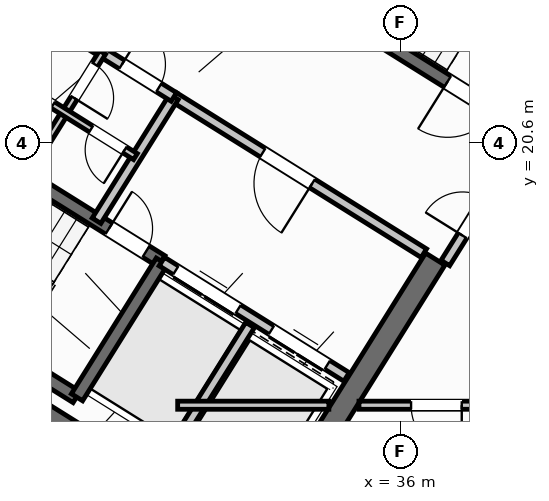
"""IFC4 building model, lengths in metres.
Left out: names, types, materials, properties, quantities, classifications, styles, units other than length and angle.
Written with IfcOpenShell. Run it as: python <this file> out.ifc"""

import sys

from ifc_helpers import new_model, si_unit, direction, frame, frame_2d, origin, place, context, subcontext, project, spatial, rectangle, extrude, source, transform, mapped, element, fill, save


model = new_model("IFC4")
c1 = context("Model", 3, precision=1e-05, world=origin(), true_north=direction((0.0, 1.0)))
c2 = subcontext(c1, "Body", "Model", "MODEL_VIEW")
j1 = project(units=[si_unit("LENGTHUNIT", "METRE"), si_unit("PLANEANGLEUNIT", "RADIAN")], contexts=[c1])
p1 = place(None, origin())
s1 = spatial("IfcSite", under=j1, at=p1, CompositionType="ELEMENT")
p2 = place(p1, origin())
s2 = spatial("IfcBuilding", under=s1, at=p2, CompositionType="ELEMENT")
p3 = place(p2, frame((0.0, 0.0, 242.1)))
s3 = spatial("IfcBuildingStorey", under=s2, at=p3, CompositionType="ELEMENT", Elevation=242.1)
p4 = place(p3, frame((33.324, 12.503, 0.0), z_axis=(0.0, 0.0, 1.0), x_axis=(-0.848043529849, 0.529926571782, 0.0)))
e1 = element("IfcWall", 1, at=p4, inside=s3, PredefinedType="SHEAR", context=c2, shape_type="SweptSolid", body=[
    extrude(rectangle(XDim=13.04, YDim=0.45, at=frame_2d((6.52, 0.0))), origin(), (0.0, 0.0, 1.0), 3.32),
])
p5 = place(p3, frame((36.683, 18.304, 0.0), z_axis=(0.0, 0.0, 1.0), x_axis=(-0.529904039071, -0.848057609704, 0.0)))
e2 = element("IfcWall", 2, at=p5, inside=s3, PredefinedType="SHEAR", context=c2, shape_type="SweptSolid", body=[
    extrude(rectangle(XDim=6.475, YDim=0.45, at=frame_2d((3.238, 0.0))), origin(), (0.0, 0.0, 1.0), 3.32),
])
p6 = place(p3, frame((29.268, 6.429, 0.0), z_axis=(0.0, 0.0, 1.0), x_axis=(-0.848049971435, 0.529916263149, 0.0)))
e3 = element("IfcWall", 3, at=p6, inside=s3, PredefinedType="STANDARD", context=c2, shape_type="SweptSolid", body=[
    extrude(rectangle(XDim=31.588, YDim=0.32, at=frame_2d((15.794, 0.0))), origin(), (0.0, 0.0, 1.0), 3.32),
])
p7 = place(p6, frame((16.235, 0.0, 0.0)))
e4 = element("IfcOpeningElement", 4, at=p7, cuts=e3, PredefinedType="OPENING", context=c2, shape_type="SweptSolid", body=[
    extrude(rectangle(XDim=1.2, YDim=2.15, at=frame_2d((0.6, 1.075))), frame((0.0, 0.17, 0.0), z_axis=(0.0, -1.0, 0.0), x_axis=(1.0, 0.0, 0.0)), (0.0, 0.0, 1.0), 0.34),
])
p8 = place(p6, frame((3.859, 0.0, 0.9)))
e5 = element("IfcOpeningElement", 5, at=p8, cuts=e3, PredefinedType="OPENING", context=c2, shape_type="SweptSolid", body=[
    extrude(rectangle(XDim=1.65, YDim=1.45, at=frame_2d((0.825, 0.725))), frame((0.0, 0.17, 0.0), z_axis=(0.0, -1.0, 0.0), x_axis=(1.0, 0.0, 0.0)), (0.0, 0.0, 1.0), 0.34),
])
p9 = place(p6, frame((10.519, 0.0, 0.9)))
e6 = element("IfcOpeningElement", 6, at=p9, cuts=e3, PredefinedType="OPENING", context=c2, shape_type="SweptSolid", body=[
    extrude(rectangle(XDim=1.65, YDim=1.45, at=frame_2d((0.825, 0.725))), frame((0.0, 0.17, 0.0), z_axis=(0.0, -1.0, 0.0), x_axis=(1.0, 0.0, 0.0)), (0.0, 0.0, 1.0), 0.34),
])
p10 = place(p6, frame((19.182, 0.0, 1.0)))
e7 = element("IfcOpeningElement", 7, at=p10, cuts=e3, PredefinedType="OPENING", context=c2, shape_type="SweptSolid", body=[
    extrude(rectangle(XDim=0.9, YDim=1.25, at=frame_2d((0.45, 0.625))), frame((0.0, 0.17, 0.0), z_axis=(0.0, -1.0, 0.0), x_axis=(1.0, 0.0, 0.0)), (0.0, 0.0, 1.0), 0.34),
])
p11 = place(p6, frame((22.524, 0.0, 1.0)))
e8 = element("IfcOpeningElement", 8, at=p11, cuts=e3, PredefinedType="OPENING", context=c2, shape_type="SweptSolid", body=[
    extrude(rectangle(XDim=0.9, YDim=1.25, at=frame_2d((0.45, 0.625))), frame((0.0, 0.17, 0.0), z_axis=(0.0, -1.0, 0.0), x_axis=(1.0, 0.0, 0.0)), (0.0, 0.0, 1.0), 0.34),
])
p12 = place(p6, frame((25.658, 0.0, 0.9)))
e9 = element("IfcOpeningElement", 9, at=p12, cuts=e3, PredefinedType="OPENING", context=c2, shape_type="SweptSolid", body=[
    extrude(rectangle(XDim=1.65, YDim=1.45, at=frame_2d((0.825, 0.725))), frame((0.0, 0.17, 0.0), z_axis=(0.0, -1.0, 0.0), x_axis=(1.0, 0.0, 0.0)), (0.0, 0.0, 1.0), 0.34),
])
p13 = place(p6, frame((29.278, 0.0, 0.9)))
e10 = element("IfcOpeningElement", 10, at=p13, cuts=e3, PredefinedType="OPENING", context=c2, shape_type="SweptSolid", body=[
    extrude(rectangle(XDim=1.35, YDim=1.45, at=frame_2d((0.675, 0.725))), frame((0.0, 0.17, 0.0), z_axis=(0.0, -1.0, 0.0), x_axis=(1.0, 0.0, 0.0)), (0.0, 0.0, 1.0), 0.34),
])
p14 = place(p3, frame((29.605, 15.581, 0.0), z_axis=(0.0, 0.0, 1.0), x_axis=(-0.848036911448, 0.529937163087, 0.0)))
e11 = element("IfcWall", 11, at=p14, inside=s3, PredefinedType="SHEAR", context=c2, shape_type="SweptSolid", body=[
    extrude(rectangle(XDim=7.46, YDim=0.26, at=frame_2d((3.73, 0.0))), origin(), (0.0, 0.0, 1.0), 3.32),
])
p15 = place(p3, frame((31.28, 18.261, 0.0), z_axis=(0.0, 0.0, 1.0), x_axis=(-0.848051618787, 0.529913626805, 0.0)))
e12 = element("IfcWall", 12, at=p15, inside=s3, PredefinedType="SHEAR", context=c2, shape_type="SweptSolid", body=[
    extrude(rectangle(XDim=7.46, YDim=0.26, at=frame_2d((3.73, 0.0))), origin(), (0.0, 0.0, 1.0), 3.32),
])
p16 = place(p15, frame((0.36, 0.0, 0.0)))
e13 = element("IfcOpeningElement", 13, at=p16, cuts=e12, PredefinedType="OPENING", context=c2, shape_type="SweptSolid", body=[
    extrude(rectangle(XDim=0.86, YDim=2.05, at=frame_2d((0.43, 1.025))), frame((0.0, 0.14, 0.0), z_axis=(0.0, -1.0, 0.0), x_axis=(1.0, 0.0, 0.0)), (0.0, 0.0, 1.0), 0.28),
])
p17 = place(p3, frame((31.288, 18.256, 0.0), z_axis=(0.0, 0.0, 1.0), x_axis=(-0.529943379326, -0.848033026897, 0.0)))
e14 = element("IfcWall", 14, at=p17, inside=s3, PredefinedType="SHEAR", context=c2, shape_type="SweptSolid", body=[
    extrude(rectangle(XDim=3.16, YDim=0.26, at=frame_2d((1.58, 0.0))), origin(), (0.0, 0.0, 1.0), 3.32),
])
p18 = place(p3, frame((38.046, 21.108, 0.0), z_axis=(0.0, 0.0, 1.0), x_axis=(-0.848054434086, 0.529909121291, 0.0)))
e15 = element("IfcWall", 15, at=p18, inside=s3, PredefinedType="SHEAR", context=c2, shape_type="SweptSolid", body=[
    extrude(rectangle(XDim=7.33, YDim=0.26, at=frame_2d((3.665, 0.0))), origin(), (0.0, 0.0, 1.0), 3.32),
])
p19 = place(p18, frame((0.22, 0.0, 0.0)))
e16 = element("IfcOpeningElement", 16, at=p19, cuts=e15, PredefinedType="OPENING", context=c2, shape_type="SweptSolid", body=[
    extrude(rectangle(XDim=1.1, YDim=2.1, at=frame_2d((0.55, 1.05))), frame((0.0, 0.14, 0.0), z_axis=(0.0, -1.0, 0.0), x_axis=(1.0, 0.0, 0.0)), (0.0, 0.0, 1.0), 0.28),
])
p20 = place(p3, frame((34.933, 15.978, 0.0), z_axis=(0.0, 0.0, 1.0), x_axis=(-0.848055739377, 0.529907032327, 0.0)))
e17 = element("IfcWall", 17, at=p20, inside=s3, PredefinedType="STANDARD", context=c2, shape_type="SweptSolid", body=[
    extrude(rectangle(XDim=4.298, YDim=0.2, at=frame_2d((2.149, 0.0))), origin(), (0.0, 0.0, 1.0), 3.31),
])
p21 = place(p20, frame((0.448, 0.0, 0.0)))
e18 = element("IfcOpeningElement", 18, at=p21, cuts=e17, PredefinedType="OPENING", context=c2, shape_type="SweptSolid", body=[
    extrude(rectangle(XDim=1.3, YDim=2.2, at=frame_2d((0.65, 1.1))), frame((0.0, 0.11, 0.0), z_axis=(0.0, -1.0, 0.0), x_axis=(1.0, 0.0, 0.0)), (0.0, 0.0, 1.0), 0.22),
])
p22 = place(p20, frame((2.523, 0.0, 0.0)))
e19 = element("IfcOpeningElement", 19, at=p22, cuts=e17, PredefinedType="OPENING", context=c2, shape_type="SweptSolid", body=[
    extrude(rectangle(XDim=1.45, YDim=2.25, at=frame_2d((0.725, 1.125))), frame((0.0, 0.11, 0.0), z_axis=(0.0, -1.0, 0.0), x_axis=(1.0, 0.0, 0.0)), (0.0, 0.0, 1.0), 0.22),
])
p23 = place(p3, frame((36.459, 18.421, 0.0), z_axis=(0.0, 0.0, 1.0), x_axis=(-0.848059591691, 0.529900867089, 0.0)))
e20 = element("IfcWall", 20, at=p23, inside=s3, PredefinedType="STANDARD", context=c2, shape_type="SweptSolid", body=[
    extrude(rectangle(XDim=5.818, YDim=0.2, at=frame_2d((2.909, 0.0))), origin(), (0.0, 0.0, 1.0), 3.31),
])
p24 = place(p23, frame((2.598, 0.0, 0.0)))
e21 = element("IfcOpeningElement", 21, at=p24, cuts=e20, PredefinedType="OPENING", context=c2, shape_type="SweptSolid", body=[
    extrude(rectangle(XDim=1.15, YDim=2.1, at=frame_2d((0.575, 1.05))), frame((0.0, 0.11, 0.0), z_axis=(0.0, -1.0, 0.0), x_axis=(1.0, 0.0, 0.0)), (0.0, 0.0, 1.0), 0.22),
])
p25 = place(p3, frame((33.029, 17.003, 0.0), z_axis=(0.0, 0.0, 1.0), x_axis=(-0.529916267533, -0.848049968695, 0.0)))
e22 = element("IfcWall", 22, at=p25, inside=s3, PredefinedType="STANDARD", context=c2, shape_type="SweptSolid", body=[
    extrude(rectangle(XDim=2.92, YDim=0.2, at=frame_2d((1.46, 0.0))), origin(), (0.0, 0.0, 1.0), 3.31),
])
p26 = place(p3, frame((31.525, 21.504, 0.0), z_axis=(0.0, 0.0, 1.0), x_axis=(-0.529907497854, -0.848055448493, 0.0)))
e23 = element("IfcWall", 23, at=p26, inside=s3, PredefinedType="STANDARD", context=c2, shape_type="SweptSolid", body=[
    extrude(rectangle(XDim=2.88, YDim=0.2, at=frame_2d((1.44, 0.0))), origin(), (0.0, 0.0, 1.0), 3.31),
])
p27 = place(p3, frame((31.525, 21.504, 0.0), z_axis=(0.0, 0.0, 1.0), x_axis=(-0.848042066329, 0.529928913853, 0.0)))
e24 = element("IfcWall", 24, at=p27, inside=s3, PredefinedType="STANDARD", context=c2, shape_type="SweptSolid", body=[
    extrude(rectangle(XDim=6.268, YDim=0.2, at=frame_2d((3.134, 0.0))), origin(), (0.0, 0.0, 1.0), 3.31),
])
p28 = place(p27, frame((4.4, 0.0, 0.0)))
e25 = element("IfcOpeningElement", 25, at=p28, cuts=e24, PredefinedType="OPENING", context=c2, shape_type="SweptSolid", body=[
    extrude(rectangle(XDim=0.86, YDim=2.05, at=frame_2d((0.43, 1.025))), frame((0.0, 0.11, 0.0), z_axis=(0.0, -1.0, 0.0), x_axis=(1.0, 0.0, 0.0)), (0.0, 0.0, 1.0), 0.22),
])
p29 = place(p27, frame((0.35, 0.0, 0.0)))
e26 = element("IfcOpeningElement", 26, at=p29, cuts=e24, PredefinedType="OPENING", context=c2, shape_type="SweptSolid", body=[
    extrude(rectangle(XDim=0.86, YDim=2.05, at=frame_2d((0.43, 1.025))), frame((0.0, 0.11, 0.0), z_axis=(0.0, -1.0, 0.0), x_axis=(1.0, 0.0, 0.0)), (0.0, 0.0, 1.0), 0.22),
])
p30 = place(p3, frame((30.117, 22.384, 0.0), z_axis=(0.0, 0.0, 1.0), x_axis=(-0.529951914384, -0.848027693204, 0.0)))
e27 = element("IfcWall", 27, at=p30, inside=s3, PredefinedType="PLUMBINGWALL", context=c2, shape_type="SweptSolid", body=[
    extrude(rectangle(XDim=1.4, YDim=0.14, at=frame_2d((0.7, 0.0))), origin(), (0.0, 0.0, 1.0), 3.31),
])
p31 = place(p30, frame((0.28, 0.0, 0.0)))
e28 = element("IfcOpeningElement", 28, at=p31, cuts=e27, PredefinedType="OPENING", context=c2, shape_type="SweptSolid", body=[
    extrude(rectangle(XDim=0.78, YDim=2.05, at=frame_2d((0.39, 1.025))), frame((0.0, 0.08, 0.0), z_axis=(0.0, -1.0, 0.0), x_axis=(1.0, 0.0, 0.0)), (0.0, 0.0, 1.0), 0.16),
])
p32 = place(p3, frame((29.375, 21.196, 0.0), z_axis=(0.0, 0.0, 1.0), x_axis=(-0.529865479138, -0.848081702443, 0.0)))
e29 = element("IfcWall", 29, at=p32, inside=s3, PredefinedType="PLUMBINGWALL", context=c2, shape_type="SweptSolid", body=[
    extrude(rectangle(XDim=1.48, YDim=0.14, at=frame_2d((0.74, 0.0))), origin(), (0.0, 0.0, 1.0), 3.31),
])
p33 = place(p3, frame((30.766, 20.327, 0.0), z_axis=(0.0, 0.0, 1.0), x_axis=(-0.848052663127, 0.529911955482, 0.0)))
e30 = element("IfcWall", 30, at=p33, inside=s3, PredefinedType="PLUMBINGWALL", context=c2, shape_type="SweptSolid", body=[
    extrude(rectangle(XDim=3.28, YDim=0.14, at=frame_2d((1.64, 0.0))), origin(), (0.0, 0.0, 1.0), 3.31),
])
p34 = place(p33, frame((0.25, 0.0, 0.0)))
e31 = element("IfcOpeningElement", 31, at=p34, cuts=e30, PredefinedType="OPENING", context=c2, shape_type="SweptSolid", body=[
    extrude(rectangle(XDim=0.78, YDim=2.05, at=frame_2d((0.39, 1.025))), frame((0.0, 0.08, 0.0), z_axis=(0.0, -1.0, 0.0), x_axis=(1.0, 0.0, 0.0)), (0.0, 0.0, 1.0), 0.16),
])
p35 = place(p33, frame((1.92, 0.0, 0.0)))
e32 = element("IfcOpeningElement", 32, at=p35, cuts=e30, PredefinedType="OPENING", context=c2, shape_type="SweptSolid", body=[
    extrude(rectangle(XDim=0.78, YDim=2.05, at=frame_2d((0.39, 1.025))), frame((0.0, 0.08, 0.0), z_axis=(0.0, -1.0, 0.0), x_axis=(1.0, 0.0, 0.0)), (0.0, 0.0, 1.0), 0.16),
])
p36 = place(p3, frame((32.164, 10.374, 0.0), z_axis=(0.0, 0.0, 1.0), x_axis=(-0.848044107957, 0.529925646633, 0.0)))
e33 = element("IfcWall", 33, at=p36, inside=s3, PredefinedType="PARTITIONING", context=c2, shape_type="SweptSolid", body=[
    extrude(rectangle(XDim=15.57, YDim=0.16, at=frame_2d((7.785, 0.0))), origin(), (0.0, 0.0, 1.0), 3.31),
])
p37 = place(p36, frame((10.83, 0.0, 0.0)))
e34 = element("IfcOpeningElement", 34, at=p37, cuts=e33, PredefinedType="OPENING", context=c2, shape_type="SweptSolid", body=[
    extrude(rectangle(XDim=1.0, YDim=2.1, at=frame_2d((0.5, 1.05))), frame((0.0, 0.09, 0.0), z_axis=(0.0, -1.0, 0.0), x_axis=(1.0, 0.0, 0.0)), (0.0, 0.0, 1.0), 0.18),
])
p38 = place(p3, frame((29.72, 8.859, 0.0), z_axis=(0.0, 0.0, 1.0), x_axis=(-0.848049134363, 0.529917602752, 0.0)))
e35 = element("IfcWall", 35, at=p38, inside=s3, PredefinedType="PLUMBINGWALL", context=c2, shape_type="SweptSolid", body=[
    extrude(rectangle(XDim=14.3, YDim=0.14, at=frame_2d((7.15, 0.0))), origin(), (0.0, 0.0, 1.0), 3.31),
])
p39 = place(p38, frame((9.57, 0.0, 0.0)))
e36 = element("IfcOpeningElement", 36, at=p39, cuts=e35, PredefinedType="OPENING", context=c2, shape_type="SweptSolid", body=[
    extrude(rectangle(XDim=0.92, YDim=2.08, at=frame_2d((0.46, 1.04))), frame((0.0, 0.08, 0.0), z_axis=(0.0, -1.0, 0.0), x_axis=(1.0, 0.0, 0.0)), (0.0, 0.0, 1.0), 0.16),
])
p40 = place(p3, frame((38.451, 20.737, 0.0), z_axis=(0.0, 0.0, 1.0), x_axis=(-0.529924799939, -0.848044637038, 0.0)))
e37 = element("IfcWall", 37, at=p40, inside=s3, PredefinedType="STANDARD", context=c2, shape_type="SweptSolid", body=[
    extrude(rectangle(XDim=2.96, YDim=0.2, at=frame_2d((1.48, 0.0))), origin(), (0.0, 0.0, 1.0), 3.31),
])
p41 = place(p40, frame((1.46, 0.0, 0.0)))
e38 = element("IfcOpeningElement", 38, at=p41, cuts=e37, PredefinedType="OPENING", context=c2, shape_type="SweptSolid", body=[
    extrude(rectangle(XDim=0.86, YDim=2.05, at=frame_2d((0.43, 1.025))), frame((0.0, 0.11, 0.0), z_axis=(0.0, -1.0, 0.0), x_axis=(1.0, 0.0, 0.0)), (0.0, 0.0, 1.0), 0.22),
])
p42 = place(p3, frame((31.6, 15.42, 0.0), z_axis=(0.0, 0.0, 1.0), x_axis=(1.0, 0.0, 0.0)))
e39 = element("IfcWall", 39, at=p42, inside=s3, PredefinedType="PARTITIONING", context=c2, shape_type="SweptSolid", body=[
    extrude(rectangle(XDim=2.984, YDim=0.16, at=frame_2d((1.492, 0.0))), origin(), (0.0, 0.0, 1.0), 3.31),
])
p43 = place(p3, frame((35.178, 15.42, 0.0), z_axis=(0.0, 0.0, 1.0), x_axis=(1.0, 0.0, 0.0)))
e40 = element("IfcWall", 40, at=p43, inside=s3, PredefinedType="PARTITIONING", context=c2, shape_type="SweptSolid", body=[
    extrude(rectangle(XDim=15.552, YDim=0.16, at=frame_2d((7.776, 0.0))), origin(), (0.0, 0.0, 1.0), 3.31),
])
p44 = place(p43, frame((1.028, 0.0, 0.0)))
e41 = element("IfcOpeningElement", 41, at=p44, cuts=e40, PredefinedType="OPENING", context=c2, shape_type="SweptSolid", body=[
    extrude(rectangle(XDim=1.0, YDim=2.1, at=frame_2d((0.5, 1.05))), frame((0.0, 0.09, 0.0), z_axis=(0.0, -1.0, 0.0), x_axis=(1.0, 0.0, 0.0)), (0.0, 0.0, 1.0), 0.18),
])
p45 = place(p43, frame((8.858, 0.0, 0.0)))
e42 = element("IfcOpeningElement", 42, at=p45, cuts=e40, PredefinedType="OPENING", context=c2, shape_type="SweptSolid", body=[
    extrude(rectangle(XDim=1.0, YDim=2.1, at=frame_2d((0.5, 1.05))), frame((0.0, 0.09, 0.0), z_axis=(0.0, -1.0, 0.0), x_axis=(1.0, 0.0, 0.0)), (0.0, 0.0, 1.0), 0.18),
])
m1 = source(origin(), c2, "Body", "SweptSolid", [
    extrude(rectangle(XDim=0.86, YDim=2.05, at=frame_2d((0.43, 1.025))), frame((0.0, 0.025, 0.0), z_axis=(0.0, -1.0, 0.0), x_axis=(1.0, 0.0, 0.0)), (0.0, 0.0, 1.0), 0.05),
])
p46 = place(p16, frame((0.86, 0.0, 0.0), z_axis=(0.0, 0.0, 1.0), x_axis=(-1.0, 0.0, 0.0)))
e43 = element("IfcDoor", 43, at=p46, inside=s3, OperationType="SINGLE_SWING_LEFT", PredefinedType="DOOR", context=c2, shape_type="MappedRepresentation", body=[
    mapped(m1, transform((0.0, 0.0, 0.0), scale=1.0)),
])
fill(e13, e43)
m2 = source(origin(), c2, "Body", "SweptSolid", [
    extrude(rectangle(XDim=1.1, YDim=2.1, at=frame_2d((0.55, 1.05))), frame((0.0, 0.025, 0.0), z_axis=(0.0, -1.0, 0.0), x_axis=(1.0, 0.0, 0.0)), (0.0, 0.0, 1.0), 0.05),
])
p47 = place(p19, origin())
e44 = element("IfcDoor", 44, at=p47, inside=s3, OperationType="SINGLE_SWING_RIGHT", PredefinedType="DOOR", context=c2, shape_type="MappedRepresentation", body=[
    mapped(m2, transform((0.0, 0.0, 0.0), scale=1.0)),
])
fill(e16, e44)
m3 = source(origin(), c2, "Body", "SweptSolid", [
    extrude(rectangle(XDim=1.15, YDim=2.1, at=frame_2d((0.575, 1.05))), frame((0.0, 0.025, 0.0), z_axis=(0.0, -1.0, 0.0), x_axis=(1.0, 0.0, 0.0)), (0.0, 0.0, 1.0), 0.05),
])
p48 = place(p24, origin())
e45 = element("IfcDoor", 45, at=p48, inside=s3, OperationType="SINGLE_SWING_LEFT", PredefinedType="DOOR", context=c2, shape_type="MappedRepresentation", body=[
    mapped(m3, transform((0.0, 0.0, 0.0), scale=1.0)),
])
fill(e21, e45)
m4 = source(origin(), c2, "Body", "SweptSolid", [
    extrude(rectangle(XDim=1.3, YDim=2.2, at=frame_2d((0.65, 1.1))), frame((0.0, 0.025, 0.0), z_axis=(0.0, -1.0, 0.0), x_axis=(1.0, 0.0, 0.0)), (0.0, 0.0, 1.0), 0.05),
])
p49 = place(p21, origin())
e46 = element("IfcDoor", 46, at=p49, inside=s3, OperationType="DOUBLE_DOOR_SLIDING", PredefinedType="DOOR", context=c2, shape_type="MappedRepresentation", body=[
    mapped(m4, transform((0.0, 0.0, 0.0), scale=1.0)),
])
fill(e18, e46)
m5 = source(origin(), c2, "Body", "SweptSolid", [
    extrude(rectangle(XDim=1.45, YDim=2.25, at=frame_2d((0.725, 1.125))), frame((0.0, 0.025, 0.0), z_axis=(0.0, -1.0, 0.0), x_axis=(1.0, 0.0, 0.0)), (0.0, 0.0, 1.0), 0.05),
])
p50 = place(p22, origin())
e47 = element("IfcDoor", 47, at=p50, inside=s3, OperationType="DOUBLE_DOOR_SLIDING", PredefinedType="DOOR", context=c2, shape_type="MappedRepresentation", body=[
    mapped(m5, transform((0.0, 0.0, 0.0), scale=1.0)),
])
fill(e19, e47)
p51 = place(p29, frame((0.86, 0.0, 0.0), z_axis=(0.0, 0.0, 1.0), x_axis=(-1.0, 0.0, 0.0)))
e48 = element("IfcDoor", 48, at=p51, inside=s3, OperationType="SINGLE_SWING_LEFT", PredefinedType="DOOR", context=c2, shape_type="MappedRepresentation", body=[
    mapped(m1, transform((0.0, 0.0, 0.0), scale=1.0)),
])
fill(e26, e48)
m6 = source(origin(), c2, "Body", "SweptSolid", [
    extrude(rectangle(XDim=0.78, YDim=2.05, at=frame_2d((0.39, 1.025))), frame((0.0, 0.025, 0.0), z_axis=(0.0, -1.0, 0.0), x_axis=(1.0, 0.0, 0.0)), (0.0, 0.0, 1.0), 0.05),
])
p52 = place(p31, origin())
e49 = element("IfcDoor", 49, at=p52, inside=s3, OperationType="SINGLE_SWING_RIGHT", PredefinedType="DOOR", context=c2, shape_type="MappedRepresentation", body=[
    mapped(m6, transform((0.0, 0.0, 0.0), scale=1.0)),
])
fill(e28, e49)
p53 = place(p34, origin())
e50 = element("IfcDoor", 50, at=p53, inside=s3, OperationType="SINGLE_SWING_LEFT", PredefinedType="DOOR", context=c2, shape_type="MappedRepresentation", body=[
    mapped(m6, transform((0.0, 0.0, 0.0), scale=1.0)),
])
fill(e31, e50)
p54 = place(p35, origin())
e51 = element("IfcDoor", 51, at=p54, inside=s3, OperationType="SINGLE_SWING_RIGHT", PredefinedType="DOOR", context=c2, shape_type="MappedRepresentation", body=[
    mapped(m6, transform((0.0, 0.0, 0.0), scale=1.0)),
])
fill(e32, e51)
p55 = place(p41, frame((0.86, 0.0, 0.0), z_axis=(0.0, 0.0, 1.0), x_axis=(-1.0, 0.0, 0.0)))
e52 = element("IfcDoor", 52, at=p55, inside=s3, OperationType="SINGLE_SWING_LEFT", PredefinedType="DOOR", context=c2, shape_type="MappedRepresentation", body=[
    mapped(m1, transform((0.0, 0.0, 0.0), scale=1.0)),
])
fill(e38, e52)
m7 = source(origin(), c2, "Body", "SweptSolid", [
    extrude(rectangle(XDim=1.0, YDim=2.1, at=frame_2d((0.5, 1.05))), frame((0.0, 0.025, 0.0), z_axis=(0.0, -1.0, 0.0), x_axis=(1.0, 0.0, 0.0)), (0.0, 0.0, 1.0), 0.05),
])
p56 = place(p44, frame((1.0, 0.0, 0.0), z_axis=(0.0, 0.0, 1.0), x_axis=(-1.0, 0.0, 0.0)))
e53 = element("IfcDoor", 53, at=p56, inside=s3, OperationType="SINGLE_SWING_LEFT", PredefinedType="DOOR", context=c2, shape_type="MappedRepresentation", body=[
    mapped(m7, transform((0.0, 0.0, 0.0), scale=1.0)),
])
fill(e41, e53)
save(model, sys.argv[1])
